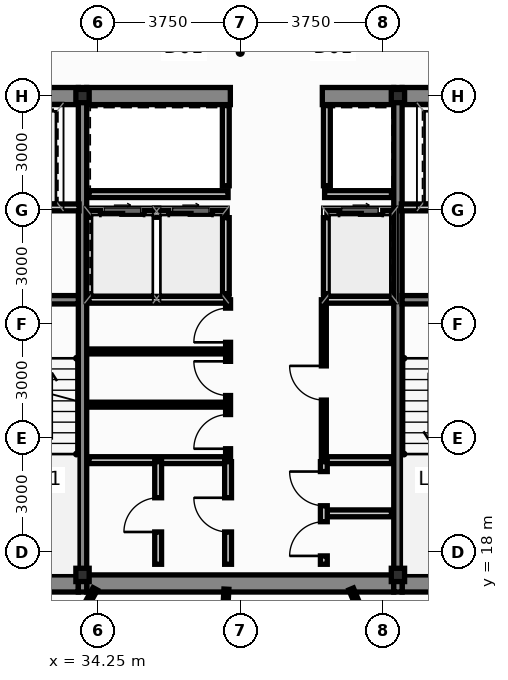
"""IFC4 building model, lengths in metres.
Left out: names, types, materials, properties, quantities, classifications, styles, units other than length and angle.
Written with IfcOpenShell. Run it as: python <this file> out.ifc"""

import sys

from ifc_helpers import new_model, si_unit, direction, frame, frame_2d, origin, origin_2d, place, context, subcontext, project, spatial, rectangle, hollow_rectangle, extrude, source, transform, mapped, element, fill, save


model = new_model("IFC4")
c1 = context("Model", 3, precision=1e-05, world=origin(), true_north=direction((0.0, 1.0)))
c2 = subcontext(c1, "Body", "Model", "MODEL_VIEW")
j1 = project(units=[si_unit("LENGTHUNIT", "METRE"), si_unit("PLANEANGLEUNIT", "RADIAN")], contexts=[c1])
p1 = place(None, origin())
s1 = spatial("IfcSite", under=j1, at=p1, CompositionType="ELEMENT")
p2 = place(p1, origin())
s2 = spatial("IfcBuilding", under=s1, at=p2, CompositionType="ELEMENT")
p3 = place(p2, frame((0.0, 0.0, 184.05)))
s3 = spatial("IfcBuildingStorey", under=s2, at=p3, CompositionType="ELEMENT", Elevation=184.05)
m1 = source(origin(), c2, "Body", "SweptSolid", [
    extrude(hollow_rectangle(XDim=0.35, YDim=0.35, WallThickness=0.016, at=origin_2d()), origin(), (0.0, 0.0, 1.0), 3.65),
])
for number, where, z_axis, x_axis in (
    (1, (33.85, 17.4, 0.0), (0.0, 0.0, 1.0), (1.0, 0.0, 0.0)),
    (2, (42.15, 17.4, 0.0), (0.0, 0.0, 1.0), (1.0, 0.0, 0.0)),
    (3, (33.85, 30.0, 0.0), (0.0, 0.0, 1.0), (1.0, 0.0, 0.0)),
    (4, (42.15, 30.0, 0.0), (0.0, 0.0, 1.0), (1.0, 0.0, 0.0)),
):
    element("IfcColumn", number, at=place(p3, frame(where, z_axis=z_axis, x_axis=x_axis)), inside=s3, PredefinedType="COLUMN", context=c2, shape_type="MappedRepresentation", body=[
        mapped(m1, transform((0.0, 0.0, 0.0), scale=1.0)),
    ])
p4 = place(p3, frame((30.84, 17.175, 0.0), z_axis=(0.0, 0.0, 1.0), x_axis=(1.0, 0.0, 0.0)))
e5 = element("IfcWall", 5, at=p4, inside=s3, PredefinedType="SHEAR", context=c2, shape_type="SweptSolid", body=[
    extrude(rectangle(XDim=2.9, YDim=0.45, at=frame_2d((1.45, 0.0))), origin(), (0.0, 0.0, 1.0), 3.65),
])
p5 = place(p3, frame((33.96, 17.175, 0.0), z_axis=(0.0, 0.0, 1.0), x_axis=(1.0, 0.0, 0.0)))
e6 = element("IfcWall", 6, at=p5, inside=s3, PredefinedType="SHEAR", context=c2, shape_type="SweptSolid", body=[
    extrude(rectangle(XDim=8.08, YDim=0.45, at=frame_2d((4.04, 0.0))), origin(), (0.0, 0.0, 1.0), 3.65),
])
for number, where, z_axis, x_axis in (
    (7, (42.26, 17.175, 0.0), (0.0, 0.0, 1.0), (1.0, 0.0, 0.0)),
    (8, (30.84, 30.0, 0.0), (0.0, 0.0, 1.0), (1.0, 0.0, 0.0)),
):
    element("IfcWall", number, at=place(p3, frame(where, z_axis=z_axis, x_axis=x_axis)), inside=s3, PredefinedType="SHEAR", context=c2, shape_type="SweptSolid", body=[
        extrude(rectangle(XDim=2.9, YDim=0.45, at=frame_2d((1.45, 0.0))), origin(), (0.0, 0.0, 1.0), 3.65),
    ])
p6 = place(p3, frame((33.96, 30.0, 0.0), z_axis=(0.0, 0.0, 1.0), x_axis=(1.0, 0.0, 0.0)))
e9 = element("IfcWall", 9, at=p6, inside=s3, PredefinedType="SHEAR", context=c2, shape_type="SweptSolid", body=[
    extrude(rectangle(XDim=3.78, YDim=0.45, at=frame_2d((1.89, 0.0))), origin(), (0.0, 0.0, 1.0), 3.65),
])
p7 = place(p3, frame((40.16, 30.0, 0.0), z_axis=(0.0, 0.0, 1.0), x_axis=(1.0, 0.0, 0.0)))
e10 = element("IfcWall", 10, at=p7, inside=s3, PredefinedType="SHEAR", context=c2, shape_type="SweptSolid", body=[
    extrude(rectangle(XDim=1.88, YDim=0.45, at=frame_2d((0.94, 0.0))), origin(), (0.0, 0.0, 1.0), 3.65),
])
p8 = place(p3, frame((42.26, 30.0, 0.0), z_axis=(0.0, 0.0, 1.0), x_axis=(1.0, 0.0, 0.0)))
e11 = element("IfcWall", 11, at=p8, inside=s3, PredefinedType="SHEAR", context=c2, shape_type="SweptSolid", body=[
    extrude(rectangle(XDim=2.9, YDim=0.45, at=frame_2d((1.45, 0.0))), origin(), (0.0, 0.0, 1.0), 3.65),
])
for number, where, z_axis, x_axis in (
    (12, (33.85, 16.95, 0.0), (0.0, 0.0, 1.0), (0.0, 1.0, 0.0)),
    (13, (42.15, 16.95, 0.0), (0.0, 0.0, 1.0), (0.0, 1.0, 0.0)),
):
    element("IfcWall", number, at=place(p3, frame(where, z_axis=z_axis, x_axis=x_axis)), inside=s3, PredefinedType="SHEAR", context=c2, shape_type="SweptSolid", body=[
        extrude(rectangle(XDim=13.275, YDim=0.22, at=frame_2d((6.638, 0.0))), origin(), (0.0, 0.0, 1.0), 3.65),
    ])
for number, where, z_axis, x_axis in (
    (14, (30.84, 24.64, 0.0), (0.0, 0.0, 1.0), (1.0, 0.0, 0.0)),
    (15, (42.26, 24.64, 0.0), (0.0, 0.0, 1.0), (1.0, 0.0, 0.0)),
):
    element("IfcWall", number, at=place(p3, frame(where, z_axis=z_axis, x_axis=x_axis)), inside=s3, PredefinedType="SHEAR", context=c2, shape_type="SweptSolid", body=[
        extrude(rectangle(XDim=2.9, YDim=0.22, at=frame_2d((1.45, 0.0))), origin(), (0.0, 0.0, 1.0), 3.65),
    ])
p9 = place(p3, frame((34.02, 26.9, 0.0), z_axis=(0.0, 0.0, 1.0), x_axis=(1.0, 0.0, 0.0)))
e16 = element("IfcWall", 16, at=p9, inside=s3, PredefinedType="PARTITIONING", context=c2, shape_type="SweptSolid", body=[
    extrude(rectangle(XDim=3.6, YDim=0.18, at=frame_2d((1.8, 0.0))), origin(), (0.0, 0.0, 1.0), 3.4),
])
p10 = place(p9, frame((0.3, 0.0, 0.0)))
e17 = element("IfcOpeningElement", 17, at=p10, cuts=e16, PredefinedType="OPENING", context=c2, shape_type="SweptSolid", body=[
    extrude(rectangle(XDim=1.15, YDim=2.2, at=frame_2d((0.575, 1.1))), frame((0.0, 0.102, 0.0), z_axis=(0.0, -1.0, 0.0), x_axis=(1.0, 0.0, 0.0)), (0.0, 0.0, 1.0), 0.204),
])
p11 = place(p9, frame((2.1, 0.0, 0.0)))
e18 = element("IfcOpeningElement", 18, at=p11, cuts=e16, PredefinedType="OPENING", context=c2, shape_type="SweptSolid", body=[
    extrude(rectangle(XDim=1.15, YDim=2.2, at=frame_2d((0.575, 1.1))), frame((0.0, 0.102, 0.0), z_axis=(0.0, -1.0, 0.0), x_axis=(1.0, 0.0, 0.0)), (0.0, 0.0, 1.0), 0.204),
])
p12 = place(p3, frame((40.28, 26.9, 0.0), z_axis=(0.0, 0.0, 1.0), x_axis=(1.0, 0.0, 0.0)))
e19 = element("IfcWall", 19, at=p12, inside=s3, PredefinedType="PARTITIONING", context=c2, shape_type="SweptSolid", body=[
    extrude(rectangle(XDim=1.7, YDim=0.18, at=frame_2d((0.85, 0.0))), origin(), (0.0, 0.0, 1.0), 3.4),
])
p13 = place(p12, frame((0.32, 0.0, 0.0)))
e20 = element("IfcOpeningElement", 20, at=p13, cuts=e19, PredefinedType="OPENING", context=c2, shape_type="SweptSolid", body=[
    extrude(rectangle(XDim=1.15, YDim=2.2, at=frame_2d((0.575, 1.1))), frame((0.0, 0.102, 0.0), z_axis=(0.0, -1.0, 0.0), x_axis=(1.0, 0.0, 0.0)), (0.0, 0.0, 1.0), 0.204),
])
for number, where, z_axis, x_axis in (
    (21, (37.62, 24.8, 0.0), (0.0, 0.0, 1.0), (0.0, 1.0, 0.0)),
    (22, (40.28, 24.8, 0.0), (0.0, 0.0, 1.0), (0.0, 1.0, 0.0)),
):
    element("IfcWall", number, at=place(p3, frame(where, z_axis=z_axis, x_axis=x_axis)), inside=s3, PredefinedType="PARTITIONING", context=c2, shape_type="SweptSolid", body=[
        extrude(rectangle(XDim=2.0, YDim=0.18, at=frame_2d((1.0, 0.0))), origin(), (0.0, 0.0, 1.0), 3.4),
    ])
p14 = place(p3, frame((34.02, 24.64, 0.0), z_axis=(0.0, 0.0, 1.0), x_axis=(1.0, 0.0, 0.0)))
e23 = element("IfcWall", 23, at=p14, inside=s3, PredefinedType="PARTITIONING", context=c2, shape_type="SweptSolid", body=[
    extrude(rectangle(XDim=3.68, YDim=0.18, at=frame_2d((1.84, 0.0))), origin(), (0.0, 0.0, 1.0), 3.4),
])
p15 = place(p3, frame((40.2, 24.64, 0.0), z_axis=(0.0, 0.0, 1.0), x_axis=(1.0, 0.0, 0.0)))
e24 = element("IfcWall", 24, at=p15, inside=s3, PredefinedType="PARTITIONING", context=c2, shape_type="SweptSolid", body=[
    extrude(rectangle(XDim=1.78, YDim=0.18, at=frame_2d((0.89, 0.0))), origin(), (0.0, 0.0, 1.0), 3.4),
])
p16 = place(p3, frame((34.02, 27.42, 0.0), z_axis=(0.0, 0.0, 1.0), x_axis=(1.0, 0.0, 0.0)))
e25 = element("IfcWall", 25, at=p16, inside=s3, PredefinedType="PARTITIONING", context=c2, shape_type="SweptSolid", body=[
    extrude(rectangle(XDim=3.66, YDim=0.18, at=frame_2d((1.83, 0.0))), origin(), (0.0, 0.0, 1.0), 3.4),
])
p17 = place(p3, frame((40.22, 27.42, 0.0), z_axis=(0.0, 0.0, 1.0), x_axis=(1.0, 0.0, 0.0)))
e26 = element("IfcWall", 26, at=p17, inside=s3, PredefinedType="PARTITIONING", context=c2, shape_type="SweptSolid", body=[
    extrude(rectangle(XDim=1.76, YDim=0.18, at=frame_2d((0.88, 0.0))), origin(), (0.0, 0.0, 1.0), 3.4),
])
for number, where, z_axis, x_axis in (
    (27, (37.62, 27.64, 0.0), (0.0, 0.0, 1.0), (0.0, 1.0, 0.0)),
    (28, (40.28, 27.64, 0.0), (0.0, 0.0, 1.0), (0.0, 1.0, 0.0)),
):
    element("IfcWall", number, at=place(p3, frame(where, z_axis=z_axis, x_axis=x_axis)), inside=s3, PredefinedType="PARTITIONING", context=c2, shape_type="SweptSolid", body=[
        extrude(rectangle(XDim=2.11, YDim=0.18, at=frame_2d((1.055, 0.0))), origin(), (0.0, 0.0, 1.0), 3.4),
    ])
for number, where, z_axis, x_axis in (
    (29, (30.86, 27.07, 0.0), (0.0, 0.0, 1.0), (1.0, 0.0, 0.0)),
    (30, (42.24, 27.07, 0.0), (0.0, 0.0, 1.0), (1.0, 0.0, 0.0)),
):
    element("IfcWall", number, at=place(p3, frame(where, z_axis=z_axis, x_axis=x_axis)), inside=s3, PredefinedType="PARTITIONING", context=c2, shape_type="SweptSolid", body=[
        extrude(rectangle(XDim=2.9, YDim=0.18, at=frame_2d((1.45, 0.0))), origin(), (0.0, 0.0, 1.0), 3.4),
    ])
p18 = place(p3, frame((34.02, 20.42, 0.0), z_axis=(0.0, 0.0, 1.0), x_axis=(1.0, 0.0, 0.0)))
e31 = element("IfcWall", 31, at=p18, inside=s3, PredefinedType="PARTITIONING", context=c2, shape_type="SweptSolid", body=[
    extrude(rectangle(XDim=3.64, YDim=0.18, at=frame_2d((1.82, 0.0))), origin(), (0.0, 0.0, 1.0), 3.4),
])
p19 = place(p3, frame((40.22, 20.42, 0.0), z_axis=(0.0, 0.0, 1.0), x_axis=(1.0, 0.0, 0.0)))
e32 = element("IfcWall", 32, at=p19, inside=s3, PredefinedType="PARTITIONING", context=c2, shape_type="SweptSolid", body=[
    extrude(rectangle(XDim=1.76, YDim=0.18, at=frame_2d((0.88, 0.0))), origin(), (0.0, 0.0, 1.0), 3.4),
])
for number, where, z_axis, x_axis in (
    (33, (34.02, 21.88, 0.0), (0.0, 0.0, 1.0), (1.0, 0.0, 0.0)),
    (34, (34.02, 23.28, 0.0), (0.0, 0.0, 1.0), (1.0, 0.0, 0.0)),
):
    element("IfcWall", number, at=place(p3, frame(where, z_axis=z_axis, x_axis=x_axis)), inside=s3, PredefinedType="PARTITIONING", context=c2, shape_type="SweptSolid", body=[
        extrude(rectangle(XDim=3.58, YDim=0.13, at=frame_2d((1.79, 0.0))), origin(), (0.0, 0.0, 1.0), 3.4),
    ])
p20 = place(p3, frame((37.68, 20.5, 0.0), z_axis=(0.0, 0.0, 1.0), x_axis=(0.0, 1.0, 0.0)))
e35 = element("IfcWall", 35, at=p20, inside=s3, PredefinedType="PARTITIONING", context=c2, shape_type="SweptSolid", body=[
    extrude(rectangle(XDim=4.14, YDim=0.13, at=frame_2d((2.07, 0.0))), origin(), (0.0, 0.0, 1.0), 3.4),
])
p21 = place(p20, frame((0.22, 0.0, 0.0)))
e36 = element("IfcOpeningElement", 36, at=p21, cuts=e35, PredefinedType="OPENING", context=c2, shape_type="SweptSolid", body=[
    extrude(rectangle(XDim=0.9, YDim=2.1, at=frame_2d((0.45, 1.05))), frame((0.0, 0.077, 0.0), z_axis=(0.0, -1.0, 0.0), x_axis=(1.0, 0.0, 0.0)), (0.0, 0.0, 1.0), 0.154),
])
p22 = place(p20, frame((1.62, 0.0, 0.0)))
e37 = element("IfcOpeningElement", 37, at=p22, cuts=e35, PredefinedType="OPENING", context=c2, shape_type="SweptSolid", body=[
    extrude(rectangle(XDim=0.9, YDim=2.1, at=frame_2d((0.45, 1.05))), frame((0.0, 0.077, 0.0), z_axis=(0.0, -1.0, 0.0), x_axis=(1.0, 0.0, 0.0)), (0.0, 0.0, 1.0), 0.154),
])
p23 = place(p20, frame((3.02, 0.0, 0.0)))
e38 = element("IfcOpeningElement", 38, at=p23, cuts=e35, PredefinedType="OPENING", context=c2, shape_type="SweptSolid", body=[
    extrude(rectangle(XDim=0.9, YDim=2.1, at=frame_2d((0.45, 1.05))), frame((0.0, 0.077, 0.0), z_axis=(0.0, -1.0, 0.0), x_axis=(1.0, 0.0, 0.0)), (0.0, 0.0, 1.0), 0.154),
])
p24 = place(p3, frame((40.2, 20.5, 0.0), z_axis=(0.0, 0.0, 1.0), x_axis=(0.0, 1.0, 0.0)))
e39 = element("IfcWall", 39, at=p24, inside=s3, PredefinedType="PARTITIONING", context=c2, shape_type="SweptSolid", body=[
    extrude(rectangle(XDim=4.14, YDim=0.13, at=frame_2d((2.07, 0.0))), origin(), (0.0, 0.0, 1.0), 3.4),
])
p25 = place(p24, frame((1.5, 0.0, 0.0)))
e40 = element("IfcOpeningElement", 40, at=p25, cuts=e39, PredefinedType="OPENING", context=c2, shape_type="SweptSolid", body=[
    extrude(rectangle(XDim=0.9, YDim=2.1, at=frame_2d((0.45, 1.05))), frame((0.0, 0.077, 0.0), z_axis=(0.0, -1.0, 0.0), x_axis=(1.0, 0.0, 0.0)), (0.0, 0.0, 1.0), 0.154),
])
p26 = place(p3, frame((35.84, 17.68, 0.0), z_axis=(0.0, 0.0, 1.0), x_axis=(0.0, 1.0, 0.0)))
e41 = element("IfcWall", 41, at=p26, inside=s3, PredefinedType="PARTITIONING", context=c2, shape_type="SweptSolid", body=[
    extrude(rectangle(XDim=2.7, YDim=0.18, at=frame_2d((1.35, 0.0))), origin(), (0.0, 0.0, 1.0), 3.4),
])
p27 = place(p26, frame((0.85, 0.0, 0.0)))
e42 = element("IfcOpeningElement", 42, at=p27, cuts=e41, PredefinedType="OPENING", context=c2, shape_type="SweptSolid", body=[
    extrude(rectangle(XDim=0.9, YDim=2.1, at=frame_2d((0.45, 1.05))), frame((0.0, 0.102, 0.0), z_axis=(0.0, -1.0, 0.0), x_axis=(1.0, 0.0, 0.0)), (0.0, 0.0, 1.0), 0.204),
])
p28 = place(p3, frame((37.68, 17.68, 0.0), z_axis=(0.0, 0.0, 1.0), x_axis=(0.0, 1.0, 0.0)))
e43 = element("IfcWall", 43, at=p28, inside=s3, PredefinedType="PARTITIONING", context=c2, shape_type="SweptSolid", body=[
    extrude(rectangle(XDim=2.7, YDim=0.18, at=frame_2d((1.35, 0.0))), origin(), (0.0, 0.0, 1.0), 3.4),
])
p29 = place(p28, frame((0.85, 0.0, 0.0)))
e44 = element("IfcOpeningElement", 44, at=p29, cuts=e43, PredefinedType="OPENING", context=c2, shape_type="SweptSolid", body=[
    extrude(rectangle(XDim=0.9, YDim=2.1, at=frame_2d((0.45, 1.05))), frame((0.0, 0.102, 0.0), z_axis=(0.0, -1.0, 0.0), x_axis=(1.0, 0.0, 0.0)), (0.0, 0.0, 1.0), 0.204),
])
p30 = place(p3, frame((40.28, 19.02, 0.0), z_axis=(0.0, 0.0, 1.0), x_axis=(1.0, 0.0, 0.0)))
e45 = element("IfcWall", 45, at=p30, inside=s3, PredefinedType="PARTITIONING", context=c2, shape_type="SweptSolid", body=[
    extrude(rectangle(XDim=1.7, YDim=0.18, at=frame_2d((0.85, 0.0))), origin(), (0.0, 0.0, 1.0), 3.4),
])
p31 = place(p3, frame((40.2, 17.68, 0.0), z_axis=(0.0, 0.0, 1.0), x_axis=(0.0, 1.0, 0.0)))
e46 = element("IfcWall", 46, at=p31, inside=s3, PredefinedType="PARTITIONING", context=c2, shape_type="SweptSolid", body=[
    extrude(rectangle(XDim=2.7, YDim=0.18, at=frame_2d((1.35, 0.0))), origin(), (0.0, 0.0, 1.0), 3.4),
])
p32 = place(p31, frame((0.22, 0.0, 0.0)))
e47 = element("IfcOpeningElement", 47, at=p32, cuts=e46, PredefinedType="OPENING", context=c2, shape_type="SweptSolid", body=[
    extrude(rectangle(XDim=0.9, YDim=2.1, at=frame_2d((0.45, 1.05))), frame((0.0, 0.102, 0.0), z_axis=(0.0, -1.0, 0.0), x_axis=(1.0, 0.0, 0.0)), (0.0, 0.0, 1.0), 0.204),
])
p33 = place(p31, frame((1.54, 0.0, 0.0)))
e48 = element("IfcOpeningElement", 48, at=p33, cuts=e46, PredefinedType="OPENING", context=c2, shape_type="SweptSolid", body=[
    extrude(rectangle(XDim=0.9, YDim=2.1, at=frame_2d((0.45, 1.05))), frame((0.0, 0.102, 0.0), z_axis=(0.0, -1.0, 0.0), x_axis=(1.0, 0.0, 0.0)), (0.0, 0.0, 1.0), 0.204),
])
p34 = place(p3, frame((28.57, 6.781, 0.0), z_axis=(0.0, 0.0, 1.0), x_axis=(0.480287077474, 0.877111351661, 0.0)))
e49 = element("IfcWall", 49, at=p34, inside=s3, PredefinedType="PARTITIONING", context=c2, shape_type="SweptSolid", body=[
    extrude(rectangle(XDim=11.689, YDim=0.13, at=frame_2d((5.844, 0.0))), origin(), (0.0, 0.0, 1.0), 3.4),
])
p35 = place(p34, frame((5.417, 0.0, 0.0)))
e50 = element("IfcOpeningElement", 50, at=p35, cuts=e49, PredefinedType="OPENING", context=c2, shape_type="SweptSolid", body=[
    extrude(rectangle(XDim=0.96, YDim=2.15, at=frame_2d((0.48, 1.075))), frame((0.0, 0.077, 0.0), z_axis=(0.0, -1.0, 0.0), x_axis=(1.0, 0.0, 0.0)), (0.0, 0.0, 1.0), 0.154),
])
p36 = place(p3, frame((40.919, 17.031, 0.0), z_axis=(0.0, 0.0, 1.0), x_axis=(0.385638121212, -0.922650117579, 0.0)))
e51 = element("IfcWall", 51, at=p36, inside=s3, PredefinedType="PARTITIONING", context=c2, shape_type="SweptSolid", body=[
    extrude(rectangle(XDim=10.795, YDim=0.13, at=frame_2d((5.397, 0.0))), origin(), (0.0, 0.0, 1.0), 3.4),
])
p37 = place(p36, frame((4.967, 0.0, 0.0)))
e52 = element("IfcOpeningElement", 52, at=p37, cuts=e51, PredefinedType="OPENING", context=c2, shape_type="SweptSolid", body=[
    extrude(rectangle(XDim=0.96, YDim=2.15, at=frame_2d((0.48, 1.075))), frame((0.0, 0.077, 0.0), z_axis=(0.0, -1.0, 0.0), x_axis=(1.0, 0.0, 0.0)), (0.0, 0.0, 1.0), 0.154),
])
p38 = place(p3, frame((37.105, 6.931, 0.0), z_axis=(0.0, 0.0, 1.0), x_axis=(0.052560100898, 0.998617762607, 0.0)))
e53 = element("IfcWall", 53, at=p38, inside=s3, PredefinedType="PARTITIONING", context=c2, shape_type="SweptSolid", body=[
    extrude(rectangle(XDim=10.107, YDim=0.13, at=frame_2d((5.054, 0.0))), origin(), (0.0, 0.0, 1.0), 3.4),
])
p39 = place(p38, frame((4.62, 0.0, 0.0)))
e54 = element("IfcOpeningElement", 54, at=p39, cuts=e53, PredefinedType="OPENING", context=c2, shape_type="SweptSolid", body=[
    extrude(rectangle(XDim=0.96, YDim=2.15, at=frame_2d((0.48, 1.075))), frame((0.0, 0.077, 0.0), z_axis=(0.0, -1.0, 0.0), x_axis=(1.0, 0.0, 0.0)), (0.0, 0.0, 1.0), 0.154),
])
p40 = place(p10, origin())
e55 = element("IfcDoor", 55, at=p40, inside=s3, OperationType="SLIDING_TO_LEFT", PredefinedType="DOOR", context=c2, shape_type="SweptSolid", body=[
    extrude(rectangle(XDim=1.15, YDim=2.2, at=frame_2d((0.575, 1.1))), frame((0.0, 0.025, 0.0), z_axis=(0.0, -1.0, 0.0), x_axis=(1.0, 0.0, 0.0)), (0.0, 0.0, 1.0), 0.05),
])
fill(e17, e55)
p41 = place(p11, origin())
e56 = element("IfcDoor", 56, at=p41, inside=s3, OperationType="SLIDING_TO_RIGHT", PredefinedType="DOOR", context=c2, shape_type="SweptSolid", body=[
    extrude(rectangle(XDim=1.15, YDim=2.2, at=frame_2d((0.575, 1.1))), frame((0.0, 0.025, 0.0), z_axis=(0.0, -1.0, 0.0), x_axis=(1.0, 0.0, 0.0)), (0.0, 0.0, 1.0), 0.05),
])
fill(e18, e56)
p42 = place(p13, origin())
e57 = element("IfcDoor", 57, at=p42, inside=s3, OperationType="SLIDING_TO_LEFT", PredefinedType="DOOR", context=c2, shape_type="SweptSolid", body=[
    extrude(rectangle(XDim=1.15, YDim=2.2, at=frame_2d((0.575, 1.1))), frame((0.0, 0.025, 0.0), z_axis=(0.0, -1.0, 0.0), x_axis=(1.0, 0.0, 0.0)), (0.0, 0.0, 1.0), 0.05),
])
fill(e20, e57)
p43 = place(p21, origin())
e58 = element("IfcDoor", 58, at=p43, inside=s3, OperationType="SINGLE_SWING_LEFT", PredefinedType="DOOR", context=c2, shape_type="SweptSolid", body=[
    extrude(rectangle(XDim=0.9, YDim=2.1, at=frame_2d((0.45, 1.05))), frame((0.0, 0.025, 0.0), z_axis=(0.0, -1.0, 0.0), x_axis=(1.0, 0.0, 0.0)), (0.0, 0.0, 1.0), 0.05),
])
fill(e36, e58)
p44 = place(p22, origin())
e59 = element("IfcDoor", 59, at=p44, inside=s3, OperationType="SINGLE_SWING_RIGHT", PredefinedType="DOOR", context=c2, shape_type="SweptSolid", body=[
    extrude(rectangle(XDim=0.9, YDim=2.1, at=frame_2d((0.45, 1.05))), frame((0.0, 0.025, 0.0), z_axis=(0.0, -1.0, 0.0), x_axis=(1.0, 0.0, 0.0)), (0.0, 0.0, 1.0), 0.05),
])
fill(e37, e59)
p45 = place(p23, origin())
e60 = element("IfcDoor", 60, at=p45, inside=s3, OperationType="SINGLE_SWING_LEFT", PredefinedType="DOOR", context=c2, shape_type="SweptSolid", body=[
    extrude(rectangle(XDim=0.9, YDim=2.1, at=frame_2d((0.45, 1.05))), frame((0.0, 0.025, 0.0), z_axis=(0.0, -1.0, 0.0), x_axis=(1.0, 0.0, 0.0)), (0.0, 0.0, 1.0), 0.05),
])
fill(e38, e60)
p46 = place(p25, origin())
e61 = element("IfcDoor", 61, at=p46, inside=s3, OperationType="SINGLE_SWING_RIGHT", PredefinedType="DOOR", context=c2, shape_type="SweptSolid", body=[
    extrude(rectangle(XDim=0.9, YDim=2.1, at=frame_2d((0.45, 1.05))), frame((0.0, 0.025, 0.0), z_axis=(0.0, -1.0, 0.0), x_axis=(1.0, 0.0, 0.0)), (0.0, 0.0, 1.0), 0.05),
])
fill(e40, e61)
p47 = place(p27, origin())
e62 = element("IfcDoor", 62, at=p47, inside=s3, OperationType="SINGLE_SWING_LEFT", PredefinedType="DOOR", context=c2, shape_type="SweptSolid", body=[
    extrude(rectangle(XDim=0.9, YDim=2.1, at=frame_2d((0.45, 1.05))), frame((0.0, 0.025, 0.0), z_axis=(0.0, -1.0, 0.0), x_axis=(1.0, 0.0, 0.0)), (0.0, 0.0, 1.0), 0.05),
])
fill(e42, e62)
p48 = place(p29, origin())
e63 = element("IfcDoor", 63, at=p48, inside=s3, OperationType="SINGLE_SWING_RIGHT", PredefinedType="DOOR", context=c2, shape_type="SweptSolid", body=[
    extrude(rectangle(XDim=0.9, YDim=2.1, at=frame_2d((0.45, 1.05))), frame((0.0, 0.025, 0.0), z_axis=(0.0, -1.0, 0.0), x_axis=(1.0, 0.0, 0.0)), (0.0, 0.0, 1.0), 0.05),
])
fill(e44, e63)
p49 = place(p32, origin())
e64 = element("IfcDoor", 64, at=p49, inside=s3, OperationType="SINGLE_SWING_LEFT", PredefinedType="DOOR", context=c2, shape_type="SweptSolid", body=[
    extrude(rectangle(XDim=0.9, YDim=2.1, at=frame_2d((0.45, 1.05))), frame((0.0, 0.025, 0.0), z_axis=(0.0, -1.0, 0.0), x_axis=(1.0, 0.0, 0.0)), (0.0, 0.0, 1.0), 0.05),
])
fill(e47, e64)
p50 = place(p33, origin())
e65 = element("IfcDoor", 65, at=p50, inside=s3, OperationType="SINGLE_SWING_RIGHT", PredefinedType="DOOR", context=c2, shape_type="SweptSolid", body=[
    extrude(rectangle(XDim=0.9, YDim=2.1, at=frame_2d((0.45, 1.05))), frame((0.0, 0.025, 0.0), z_axis=(0.0, -1.0, 0.0), x_axis=(1.0, 0.0, 0.0)), (0.0, 0.0, 1.0), 0.05),
])
fill(e48, e65)
save(model, sys.argv[1])
